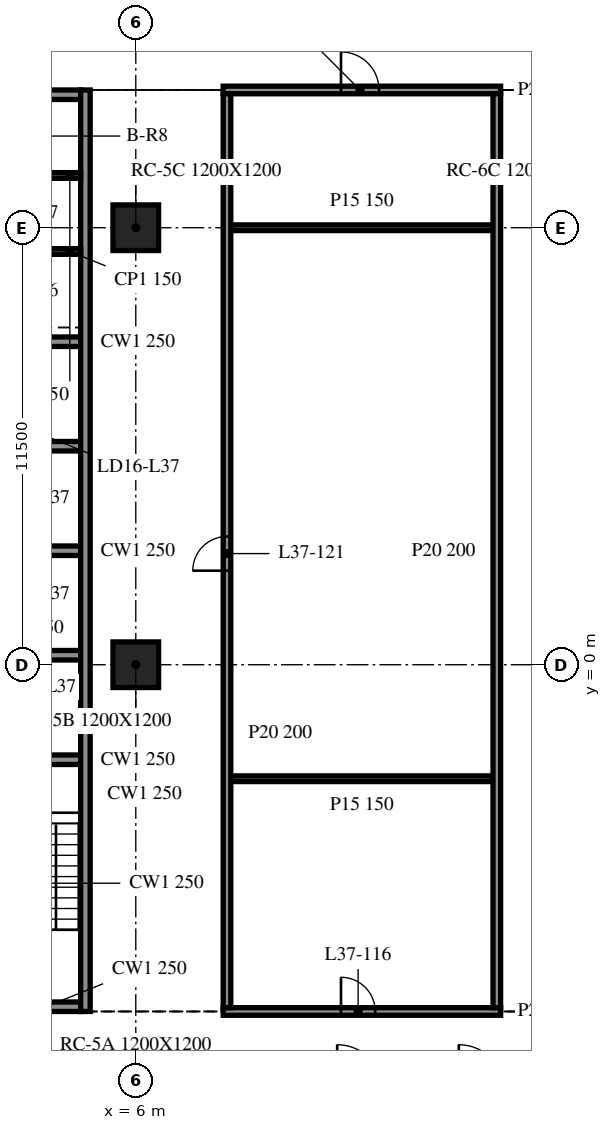
"""IFC4 building model, lengths in metres.
Left out: names, types, materials, properties, quantities, classifications, styles, units other than length and angle.
Written with IfcOpenShell. Run it as: python <this file> out.ifc"""

import sys

from ifc_helpers import new_model, si_unit, direction, frame, frame_2d, origin, origin_2d, place, context, subcontext, project, spatial, rectangle, extrude, element, fill, save


model = new_model("IFC4")
c1 = context("Model", 3, precision=1e-05, world=origin(), true_north=direction((0.0, 1.0)))
c2 = subcontext(c1, "Body", "Model", "MODEL_VIEW")
j1 = project(units=[si_unit("LENGTHUNIT", "METRE"), si_unit("PLANEANGLEUNIT", "RADIAN")], contexts=[c1])
p1 = place(None, origin())
s1 = spatial("IfcSite", under=j1, at=p1, CompositionType="ELEMENT")
p2 = place(p1, origin())
s2 = spatial("IfcBuilding", under=s1, at=p2, CompositionType="ELEMENT")
p3 = place(p2, frame((0.0, 0.0, 159.2)))
s3 = spatial("IfcBuildingStorey", under=s2, at=p3, CompositionType="ELEMENT", Elevation=159.2)
for number, where, z_axis, x_axis in (
    (1, (6.0, 0.0, -0.34), (0.0, 0.0, 1.0), (1.0, 0.0, 0.0)),
    (2, (6.0, 11.5, -0.34), (0.0, 0.0, 1.0), (1.0, 0.0, 0.0)),
):
    element("IfcColumn", number, at=place(p3, frame(where, z_axis=z_axis, x_axis=x_axis)), inside=s3, PredefinedType="COLUMN", context=c2, shape_type="SweptSolid", body=[
        extrude(rectangle(XDim=1.2, YDim=1.2, at=origin_2d()), origin(), (0.0, 0.0, 1.0), 3.8),
    ])
p4 = place(p3, frame((4.675, -9.125, 0.0), z_axis=(0.0, 0.0, 1.0), x_axis=(0.0, 1.0, 0.0)))
e3 = element("IfcWall", 3, at=p4, inside=s3, PredefinedType="SOLIDWALL", context=c2, shape_type="SweptSolid", body=[
    extrude(rectangle(XDim=24.25, YDim=0.25, at=frame_2d((12.125, 0.0))), origin(), (0.0, 0.0, 1.0), 3.46),
])
p5 = place(p3, frame((4.55, -9.0, 0.0), z_axis=(0.0, 0.0, 1.0), x_axis=(-1.0, 0.0, 0.0)))
e4 = element("IfcWall", 4, at=p5, inside=s3, PredefinedType="SOLIDWALL", context=c2, shape_type="SweptSolid", body=[
    extrude(rectangle(XDim=9.1, YDim=0.25, at=frame_2d((4.55, 0.0))), origin(), (0.0, 0.0, 1.0), 3.46),
])
p6 = place(p5, frame((3.65, 0.0, 0.0)))
e5 = element("IfcOpeningElement", 5, at=p6, cuts=e4, PredefinedType="OPENING", context=c2, shape_type="SweptSolid", body=[
    extrude(rectangle(XDim=1.8, YDim=2.1, at=frame_2d((0.9, 1.05))), frame((0.0, 0.135, 0.0), z_axis=(0.0, -1.0, 0.0), x_axis=(1.0, 0.0, 0.0)), (0.0, 0.0, 1.0), 0.27),
])
p7 = place(p3, frame((-4.55, 15.0, 0.0), z_axis=(0.0, 0.0, 1.0), x_axis=(1.0, 0.0, 0.0)))
e6 = element("IfcWall", 6, at=p7, inside=s3, PredefinedType="SOLIDWALL", context=c2, shape_type="SweptSolid", body=[
    extrude(rectangle(XDim=9.1, YDim=0.25, at=frame_2d((4.55, 0.0))), origin(), (0.0, 0.0, 1.0), 3.46),
])
p8 = place(p7, frame((3.65, 0.0, 0.0)))
e7 = element("IfcOpeningElement", 7, at=p8, cuts=e6, PredefinedType="OPENING", context=c2, shape_type="SweptSolid", body=[
    extrude(rectangle(XDim=1.8, YDim=2.1, at=frame_2d((0.9, 1.05))), frame((0.0, 0.135, 0.0), z_axis=(0.0, -1.0, 0.0), x_axis=(1.0, 0.0, 0.0)), (0.0, 0.0, 1.0), 0.27),
])
for number, where, z_axis, x_axis in (
    (8, (1.7, -2.5, 0.0), (0.0, 0.0, 1.0), (1.0, 0.0, 0.0)),
    (9, (1.7, 0.25, 0.0), (0.0, 0.0, 1.0), (1.0, 0.0, 0.0)),
    (10, (1.7, 3.0, 0.0), (0.0, 0.0, 1.0), (1.0, 0.0, 0.0)),
    (11, (1.7, 5.75, 0.0), (0.0, 0.0, 1.0), (1.0, 0.0, 0.0)),
    (12, (1.7, 8.5, 0.0), (0.0, 0.0, 1.0), (1.0, 0.0, 0.0)),
):
    element("IfcWall", number, at=place(p3, frame(where, z_axis=z_axis, x_axis=x_axis)), inside=s3, PredefinedType="SOLIDWALL", context=c2, shape_type="SweptSolid", body=[
        extrude(rectangle(XDim=2.85, YDim=0.25, at=frame_2d((1.425, 0.0))), origin(), (0.0, 0.0, 1.0), 3.46),
    ])
for number, where, z_axis, x_axis in (
    (13, (1.7, 10.875, 0.0), (0.0, 0.0, 1.0), (1.0, 0.0, 0.0)),
    (14, (1.7, 12.875, 0.0), (0.0, 0.0, 1.0), (1.0, 0.0, 0.0)),
):
    element("IfcWall", number, at=place(p3, frame(where, z_axis=z_axis, x_axis=x_axis)), inside=s3, PredefinedType="PARTITIONING", context=c2, shape_type="SweptSolid", body=[
        extrude(rectangle(XDim=2.85, YDim=0.15, at=frame_2d((1.425, 0.0))), origin(), (0.0, 0.0, 1.0), 3.46),
    ])
p9 = place(p3, frame((8.3, -9.125, 0.0), z_axis=(0.0, 0.0, 1.0), x_axis=(1.0, 0.0, 0.0)))
e15 = element("IfcWall", 15, at=p9, inside=s3, PredefinedType="PARTITIONING", context=c2, shape_type="SweptSolid", body=[
    extrude(rectangle(XDim=7.3, YDim=0.2, at=frame_2d((3.65, 0.0))), origin(), (0.0, 0.0, 1.0), 3.46),
])
p10 = place(p9, frame((3.1, 0.0, 0.0)))
e16 = element("IfcOpeningElement", 16, at=p10, cuts=e15, PredefinedType="OPENING", context=c2, shape_type="SweptSolid", body=[
    extrude(rectangle(XDim=0.9, YDim=2.1, at=frame_2d((0.45, 1.05))), frame((0.0, 0.11, 0.0), z_axis=(0.0, -1.0, 0.0), x_axis=(1.0, 0.0, 0.0)), (0.0, 0.0, 1.0), 0.22),
])
for number, where, z_axis, x_axis in (
    (17, (8.5, -3.0, 0.0), (0.0, 0.0, 1.0), (1.0, 0.0, 0.0)),
    (18, (8.5, 11.5, 0.0), (0.0, 0.0, 1.0), (1.0, 0.0, 0.0)),
):
    element("IfcWall", number, at=place(p3, frame(where, z_axis=z_axis, x_axis=x_axis)), inside=s3, PredefinedType="PARTITIONING", context=c2, shape_type="SweptSolid", body=[
        extrude(rectangle(XDim=6.9, YDim=0.15, at=frame_2d((3.45, 0.0))), origin(), (0.0, 0.0, 1.0), 3.46),
    ])
p11 = place(p3, frame((8.3, 15.125, 0.0), z_axis=(0.0, 0.0, 1.0), x_axis=(1.0, 0.0, 0.0)))
e19 = element("IfcWall", 19, at=p11, inside=s3, PredefinedType="PARTITIONING", context=c2, shape_type="SweptSolid", body=[
    extrude(rectangle(XDim=7.3, YDim=0.2, at=frame_2d((3.65, 0.0))), origin(), (0.0, 0.0, 1.0), 3.46),
])
p12 = place(p11, frame((3.1, 0.0, 0.0)))
e20 = element("IfcOpeningElement", 20, at=p12, cuts=e19, PredefinedType="OPENING", context=c2, shape_type="SweptSolid", body=[
    extrude(rectangle(XDim=1.0, YDim=2.1, at=frame_2d((0.5, 1.05))), frame((0.0, 0.11, 0.0), z_axis=(0.0, -1.0, 0.0), x_axis=(1.0, 0.0, 0.0)), (0.0, 0.0, 1.0), 0.22),
])
p13 = place(p3, frame((8.4, -9.025, 0.0), z_axis=(0.0, 0.0, 1.0), x_axis=(0.0, 1.0, 0.0)))
e21 = element("IfcWall", 21, at=p13, inside=s3, PredefinedType="PARTITIONING", context=c2, shape_type="SweptSolid", body=[
    extrude(rectangle(XDim=24.05, YDim=0.2, at=frame_2d((12.025, 0.0))), origin(), (0.0, 0.0, 1.0), 3.46),
])
p14 = place(p13, frame((11.5, 0.0, 0.0)))
e22 = element("IfcOpeningElement", 22, at=p14, cuts=e21, PredefinedType="OPENING", context=c2, shape_type="SweptSolid", body=[
    extrude(rectangle(XDim=0.9, YDim=2.1, at=frame_2d((0.45, 1.05))), frame((0.0, 0.11, 0.0), z_axis=(0.0, -1.0, 0.0), x_axis=(1.0, 0.0, 0.0)), (0.0, 0.0, 1.0), 0.22),
])
p15 = place(p3, frame((15.5, -9.025, 0.0), z_axis=(0.0, 0.0, 1.0), x_axis=(0.0, 1.0, 0.0)))
e23 = element("IfcWall", 23, at=p15, inside=s3, PredefinedType="PARTITIONING", context=c2, shape_type="SweptSolid", body=[
    extrude(rectangle(XDim=24.05, YDim=0.2, at=frame_2d((12.025, 0.0))), origin(), (0.0, 0.0, 1.0), 3.46),
])
p16 = place(p10, origin())
e24 = element("IfcDoor", 24, at=p16, inside=s3, OperationType="SINGLE_SWING_LEFT", PredefinedType="DOOR", context=c2, shape_type="SweptSolid", body=[
    extrude(rectangle(XDim=0.9, YDim=2.1, at=frame_2d((0.45, 1.05))), frame((0.0, 0.025, 0.0), z_axis=(0.0, -1.0, 0.0), x_axis=(1.0, 0.0, 0.0)), (0.0, 0.0, 1.0), 0.05),
])
fill(e16, e24)
p17 = place(p14, origin())
e25 = element("IfcDoor", 25, at=p17, inside=s3, OperationType="SINGLE_SWING_RIGHT", PredefinedType="DOOR", context=c2, shape_type="SweptSolid", body=[
    extrude(rectangle(XDim=0.9, YDim=2.1, at=frame_2d((0.45, 1.05))), frame((0.0, 0.025, 0.0), z_axis=(0.0, -1.0, 0.0), x_axis=(1.0, 0.0, 0.0)), (0.0, 0.0, 1.0), 0.05),
])
fill(e22, e25)
p18 = place(p12, origin())
e26 = element("IfcDoor", 26, at=p18, inside=s3, OperationType="SINGLE_SWING_RIGHT", PredefinedType="DOOR", context=c2, shape_type="SweptSolid", body=[
    extrude(rectangle(XDim=1.0, YDim=2.1, at=frame_2d((0.5, 1.05))), frame((0.0, 0.025, 0.0), z_axis=(0.0, -1.0, 0.0), x_axis=(1.0, 0.0, 0.0)), (0.0, 0.0, 1.0), 0.05),
])
fill(e20, e26)
save(model, sys.argv[1])
